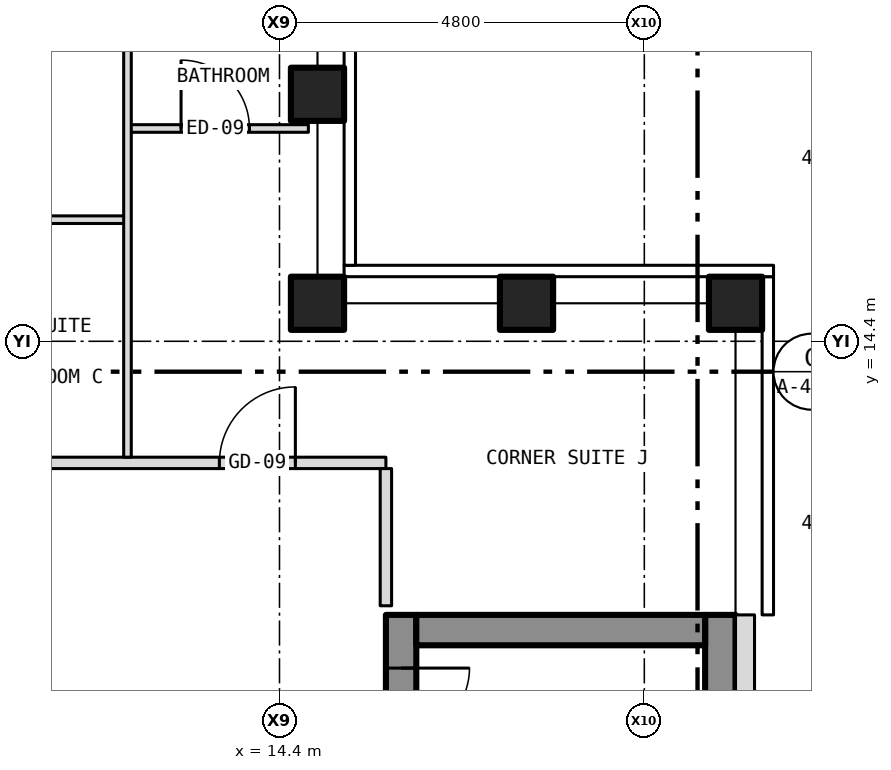
"""IFC4 building model, lengths in metres.
Left out: names, types, materials, properties, quantities, classifications, styles, units other than length and angle.
Written with IfcOpenShell. Run it as: python <this file> out.ifc"""

import sys

from ifc_helpers import new_model, si_unit, direction, frame, frame_2d, origin, origin_2d, place, context, subcontext, project, spatial, rectangle, hollow_rectangle, extrude, element, fill, save


model = new_model("IFC4")
c1 = context("Model", 3, precision=1e-05, world=origin(), true_north=direction((0.0, 1.0)))
c2 = subcontext(c1, "Body", "Model", "MODEL_VIEW")
j1 = project(units=[si_unit("LENGTHUNIT", "METRE"), si_unit("PLANEANGLEUNIT", "RADIAN")], contexts=[c1])
p1 = place(None, origin())
s1 = spatial("IfcSite", under=j1, at=p1, CompositionType="ELEMENT")
p2 = place(p1, origin())
s2 = spatial("IfcBuilding", under=s1, at=p2, CompositionType="ELEMENT")
p3 = place(p2, frame((0.0, 0.0, 194.5)))
s3 = spatial("IfcBuildingStorey", under=s2, at=p3, CompositionType="ELEMENT", Elevation=194.5)
for number, where, z_axis, x_axis in (
    (1, (20.4, 14.9, -0.15), (0.0, 0.0, 1.0), (1.0, 0.0, 0.0)),
    (2, (14.9, 14.9, -0.15), (0.0, 0.0, 1.0), (1.0, 0.0, 0.0)),
    (3, (14.9, 17.65, -0.15), (0.0, 0.0, 1.0), (1.0, 0.0, 0.0)),
    (4, (17.65, 14.9, -0.15), (0.0, 0.0, 1.0), (1.0, 0.0, 0.0)),
):
    element("IfcColumn", number, at=place(p3, frame(where, z_axis=z_axis, x_axis=x_axis)), inside=s3, PredefinedType="COLUMN", context=c2, shape_type="SweptSolid", body=[
        extrude(hollow_rectangle(XDim=0.7, YDim=0.7, WallThickness=0.04, at=origin_2d()), origin(), (0.0, 0.0, 1.0), 3.5),
    ])
p4 = place(p3, frame((16.0, -10.8, 0.0), z_axis=(0.0, 0.0, 1.0), x_axis=(0.0, 1.0, 0.0)))
e5 = element("IfcWall", 5, at=p4, inside=s3, PredefinedType="SHEAR", context=c2, shape_type="SweptSolid", body=[
    extrude(rectangle(XDim=21.6, YDim=0.4, at=frame_2d((10.8, 0.0))), origin(), (0.0, 0.0, 1.0), 3.25),
])
p5 = place(p4, frame((9.4, 0.0, 0.0)))
e6 = element("IfcOpeningElement", 6, at=p5, cuts=e5, PredefinedType="OPENING", context=c2, shape_type="SweptSolid", body=[
    extrude(rectangle(XDim=1.1, YDim=2.1, at=frame_2d((0.55, 1.05))), frame((0.0, 0.212, 0.0), z_axis=(0.0, -1.0, 0.0), x_axis=(1.0, 0.0, 0.0)), (0.0, 0.0, 1.0), 0.424),
])
p6 = place(p4, frame((11.5, 0.0, 0.0)))
e7 = element("IfcOpeningElement", 7, at=p6, cuts=e5, PredefinedType="OPENING", context=c2, shape_type="SweptSolid", body=[
    extrude(rectangle(XDim=1.1, YDim=2.1, at=frame_2d((0.55, 1.05))), frame((0.0, 0.212, 0.0), z_axis=(0.0, -1.0, 0.0), x_axis=(1.0, 0.0, 0.0)), (0.0, 0.0, 1.0), 0.424),
])
p7 = place(p4, frame((13.6, 0.0, 0.0)))
e8 = element("IfcOpeningElement", 8, at=p7, cuts=e5, PredefinedType="OPENING", context=c2, shape_type="SweptSolid", body=[
    extrude(rectangle(XDim=1.1, YDim=2.1, at=frame_2d((0.55, 1.05))), frame((0.0, 0.212, 0.0), z_axis=(0.0, -1.0, 0.0), x_axis=(1.0, 0.0, 0.0)), (0.0, 0.0, 1.0), 0.424),
])
p8 = place(p4, frame((15.7, 0.0, 0.0)))
e9 = element("IfcOpeningElement", 9, at=p8, cuts=e5, PredefinedType="OPENING", context=c2, shape_type="SweptSolid", body=[
    extrude(rectangle(XDim=1.1, YDim=2.1, at=frame_2d((0.55, 1.05))), frame((0.0, 0.212, 0.0), z_axis=(0.0, -1.0, 0.0), x_axis=(1.0, 0.0, 0.0)), (0.0, 0.0, 1.0), 0.424),
])
p9 = place(p4, frame((17.8, 0.0, 0.0)))
e10 = element("IfcOpeningElement", 10, at=p9, cuts=e5, PredefinedType="OPENING", context=c2, shape_type="SweptSolid", body=[
    extrude(rectangle(XDim=1.1, YDim=2.1, at=frame_2d((0.55, 1.05))), frame((0.0, 0.212, 0.0), z_axis=(0.0, -1.0, 0.0), x_axis=(1.0, 0.0, 0.0)), (0.0, 0.0, 1.0), 0.424),
])
p10 = place(p4, frame((5.642, 0.0, 0.0)))
e11 = element("IfcOpeningElement", 11, at=p10, cuts=e5, PredefinedType="OPENING", context=c2, shape_type="SweptSolid", body=[
    extrude(rectangle(XDim=1.1, YDim=2.1, at=frame_2d((0.55, 1.05))), frame((0.0, 0.212, 0.0), z_axis=(0.0, -1.0, 0.0), x_axis=(1.0, 0.0, 0.0)), (0.0, 0.0, 1.0), 0.424),
])
p11 = place(p4, frame((7.5, 0.0, 0.0)))
e12 = element("IfcOpeningElement", 12, at=p11, cuts=e5, PredefinedType="OPENING", context=c2, shape_type="SweptSolid", body=[
    extrude(rectangle(XDim=1.1, YDim=2.1, at=frame_2d((0.55, 1.05))), frame((0.0, 0.212, 0.0), z_axis=(0.0, -1.0, 0.0), x_axis=(1.0, 0.0, 0.0)), (0.0, 0.0, 1.0), 0.424),
])
p12 = place(p4, frame((20.0, 0.0, 0.0)))
e13 = element("IfcOpeningElement", 13, at=p12, cuts=e5, PredefinedType="OPENING", context=c2, shape_type="SweptSolid", body=[
    extrude(rectangle(XDim=0.9, YDim=2.1, at=frame_2d((0.45, 1.05))), frame((0.0, 0.212, 0.0), z_axis=(0.0, -1.0, 0.0), x_axis=(1.0, 0.0, 0.0)), (0.0, 0.0, 1.0), 0.424),
])
p13 = place(p3, frame((20.2, -10.8, 0.0), z_axis=(0.0, 0.0, 1.0), x_axis=(0.0, 1.0, 0.0)))
e14 = element("IfcWall", 14, at=p13, inside=s3, PredefinedType="SHEAR", context=c2, shape_type="SweptSolid", body=[
    extrude(rectangle(XDim=21.6, YDim=0.4, at=frame_2d((10.8, 0.0))), origin(), (0.0, 0.0, 1.0), 3.25),
])
p14 = place(p3, frame((16.2, 10.6, 0.0), z_axis=(0.0, 0.0, 1.0), x_axis=(1.0, 0.0, 0.0)))
e15 = element("IfcWall", 15, at=p14, inside=s3, PredefinedType="SHEAR", context=c2, shape_type="SweptSolid", body=[
    extrude(rectangle(XDim=3.8, YDim=0.4, at=frame_2d((1.9, 0.0))), origin(), (0.0, 0.0, 1.0), 3.25),
])
p15 = place(p3, frame((20.525, -10.8, 0.0), z_axis=(0.0, 0.0, 1.0), x_axis=(0.0, 1.0, 0.0)))
e16 = element("IfcWall", 16, at=p15, inside=s3, PredefinedType="SOLIDWALL", context=c2, shape_type="SweptSolid", body=[
    extrude(rectangle(XDim=21.6, YDim=0.25, at=frame_2d((10.8, 0.0))), origin(), (0.0, 0.0, 1.0), 3.5),
])
p16 = place(p15, frame((2.95, 0.0, 1.0)))
e17 = element("IfcOpeningElement", 17, at=p16, cuts=e16, PredefinedType="OPENING", context=c2, shape_type="SweptSolid", body=[
    extrude(rectangle(XDim=0.6, YDim=1.5, at=frame_2d((0.3, 0.75))), frame((0.0, 0.137, 0.0), z_axis=(0.0, -1.0, 0.0), x_axis=(1.0, 0.0, 0.0)), (0.0, 0.0, 1.0), 0.274),
])
p17 = place(p3, frame((-15.8, 12.8, 0.0), z_axis=(0.0, 0.0, 1.0), x_axis=(1.0, 0.0, 0.0)))
e18 = element("IfcWall", 18, at=p17, inside=s3, PredefinedType="PARTITIONING", context=c2, shape_type="SweptSolid", body=[
    extrude(rectangle(XDim=31.6, YDim=0.15, at=frame_2d((15.8, 0.0))), origin(), (0.0, 0.0, 1.0), 3.35),
])
p18 = place(p17, frame((7.708, 0.0, 0.0)))
e19 = element("IfcOpeningElement", 19, at=p18, cuts=e18, PredefinedType="OPENING", context=c2, shape_type="SweptSolid", body=[
    extrude(rectangle(XDim=1.0, YDim=2.1, at=frame_2d((0.5, 1.05))), frame((0.0, 0.087, 0.0), z_axis=(0.0, -1.0, 0.0), x_axis=(1.0, 0.0, 0.0)), (0.0, 0.0, 1.0), 0.174),
])
p19 = place(p17, frame((12.568, 0.0, 0.0)))
e20 = element("IfcOpeningElement", 20, at=p19, cuts=e18, PredefinedType="OPENING", context=c2, shape_type="SweptSolid", body=[
    extrude(rectangle(XDim=1.0, YDim=2.1, at=frame_2d((0.5, 1.05))), frame((0.0, 0.087, 0.0), z_axis=(0.0, -1.0, 0.0), x_axis=(1.0, 0.0, 0.0)), (0.0, 0.0, 1.0), 0.174),
])
p20 = place(p17, frame((22.892, 0.0, 0.0)))
e21 = element("IfcOpeningElement", 21, at=p20, cuts=e18, PredefinedType="OPENING", context=c2, shape_type="SweptSolid", body=[
    extrude(rectangle(XDim=1.0, YDim=2.1, at=frame_2d((0.5, 1.05))), frame((0.0, 0.087, 0.0), z_axis=(0.0, -1.0, 0.0), x_axis=(1.0, 0.0, 0.0)), (0.0, 0.0, 1.0), 0.174),
])
p21 = place(p17, frame((1.192, 0.0, 0.0)))
e22 = element("IfcOpeningElement", 22, at=p21, cuts=e18, PredefinedType="OPENING", context=c2, shape_type="SweptSolid", body=[
    extrude(rectangle(XDim=1.0, YDim=2.1, at=frame_2d((0.5, 1.05))), frame((0.0, 0.087, 0.0), z_axis=(0.0, -1.0, 0.0), x_axis=(1.0, 0.0, 0.0)), (0.0, 0.0, 1.0), 0.174),
])
p22 = place(p17, frame((29.409, 0.0, 0.0)))
e23 = element("IfcOpeningElement", 23, at=p22, cuts=e18, PredefinedType="OPENING", context=c2, shape_type="SweptSolid", body=[
    extrude(rectangle(XDim=1.0, YDim=2.1, at=frame_2d((0.5, 1.05))), frame((0.0, 0.087, 0.0), z_axis=(0.0, -1.0, 0.0), x_axis=(1.0, 0.0, 0.0)), (0.0, 0.0, 1.0), 0.174),
])
p23 = place(p3, frame((10.2, 16.0, 0.0), z_axis=(0.0, 0.0, 1.0), x_axis=(1.0, 0.0, 0.0)))
e24 = element("IfcWall", 24, at=p23, inside=s3, PredefinedType="PARTITIONING", context=c2, shape_type="SweptSolid", body=[
    extrude(rectangle(XDim=2.2, YDim=0.1, at=frame_2d((1.1, 0.0))), origin(), (0.0, 0.0, 1.0), 3.35),
])
p24 = place(p3, frame((12.4, 17.2, 0.0), z_axis=(0.0, 0.0, 1.0), x_axis=(1.0, 0.0, 0.0)))
e25 = element("IfcWall", 25, at=p24, inside=s3, PredefinedType="PARTITIONING", context=c2, shape_type="SweptSolid", body=[
    extrude(rectangle(XDim=2.38, YDim=0.1, at=frame_2d((1.19, 0.0))), origin(), (0.0, 0.0, 1.0), 3.35),
])
p25 = place(p24, frame((0.705, 0.0, 0.0)))
e26 = element("IfcOpeningElement", 26, at=p25, cuts=e25, PredefinedType="OPENING", context=c2, shape_type="SweptSolid", body=[
    extrude(rectangle(XDim=0.9, YDim=2.1, at=frame_2d((0.45, 1.05))), frame((0.0, 0.062, 0.0), z_axis=(0.0, -1.0, 0.0), x_axis=(1.0, 0.0, 0.0)), (0.0, 0.0, 1.0), 0.124),
])
p26 = place(p3, frame((12.4, 12.875, 0.0), z_axis=(0.0, 0.0, 1.0), x_axis=(0.0, 1.0, 0.0)))
e27 = element("IfcWall", 27, at=p26, inside=s3, PredefinedType="PARTITIONING", context=c2, shape_type="SweptSolid", body=[
    extrude(rectangle(XDim=7.905, YDim=0.1, at=frame_2d((3.953, 0.0))), origin(), (0.0, 0.0, 1.0), 3.35),
])
p27 = place(p3, frame((15.8, 10.92, 0.0), z_axis=(0.0, 0.0, 1.0), x_axis=(0.0, 1.0, 0.0)))
e28 = element("IfcWall", 28, at=p27, inside=s3, PredefinedType="PARTITIONING", context=c2, shape_type="SweptSolid", body=[
    extrude(rectangle(XDim=1.805, YDim=0.15, at=frame_2d((0.903, 0.0))), origin(), (0.0, 0.0, 1.0), 3.35),
])
p28 = place(p12, origin())
e29 = element("IfcDoor", 29, at=p28, inside=s3, OperationType="SINGLE_SWING_RIGHT", PredefinedType="DOOR", context=c2, shape_type="SweptSolid", body=[
    extrude(rectangle(XDim=0.9, YDim=2.1, at=frame_2d((0.45, 1.05))), frame((0.0, 0.025, 0.0), z_axis=(0.0, -1.0, 0.0), x_axis=(1.0, 0.0, 0.0)), (0.0, 0.0, 1.0), 0.05),
])
fill(e13, e29)
p29 = place(p25, origin())
e30 = element("IfcDoor", 30, at=p29, inside=s3, OperationType="SINGLE_SWING_LEFT", PredefinedType="DOOR", context=c2, shape_type="SweptSolid", body=[
    extrude(rectangle(XDim=0.9, YDim=2.1, at=frame_2d((0.45, 1.05))), frame((0.0, 0.025, 0.0), z_axis=(0.0, -1.0, 0.0), x_axis=(1.0, 0.0, 0.0)), (0.0, 0.0, 1.0), 0.05),
])
fill(e26, e30)
p30 = place(p22, origin())
e31 = element("IfcDoor", 31, at=p30, inside=s3, OperationType="SINGLE_SWING_RIGHT", PredefinedType="DOOR", context=c2, shape_type="SweptSolid", body=[
    extrude(rectangle(XDim=1.0, YDim=2.1, at=frame_2d((0.5, 1.05))), frame((0.0, 0.025, 0.0), z_axis=(0.0, -1.0, 0.0), x_axis=(1.0, 0.0, 0.0)), (0.0, 0.0, 1.0), 0.05),
])
fill(e23, e31)
save(model, sys.argv[1])
